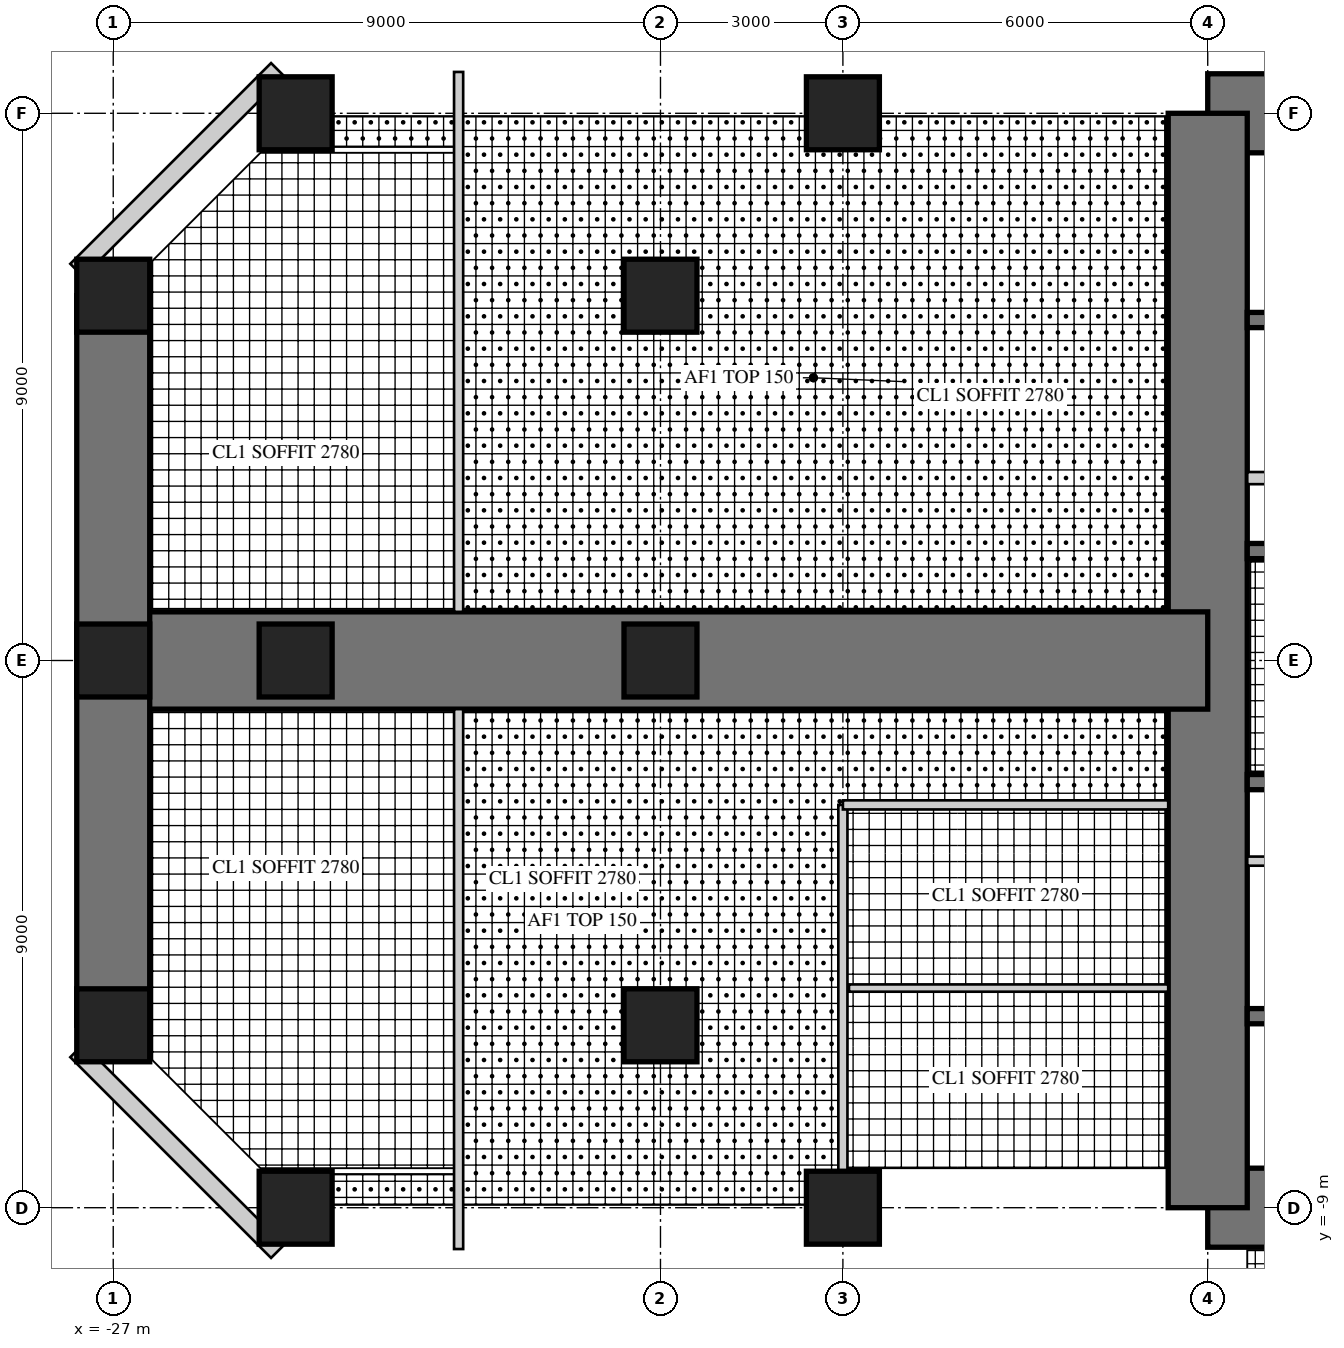
"""IFC4 building model, lengths in metres.
Left out: names, types, materials, properties, quantities, classifications, styles, units other than length and angle.
Written with IfcOpenShell. Run it as: python <this file> out.ifc"""

import sys

from ifc_helpers import new_model, si_unit, direction, frame, frame_2d, origin, origin_2d, place, context, subcontext, project, spatial, rectangle, hollow_rectangle, extrude, element, fill, save


model = new_model("IFC4")
c1 = context("Model", 3, precision=1e-05, world=origin(), true_north=direction((0.0, 1.0)))
c2 = subcontext(c1, "Body", "Model", "MODEL_VIEW")
j1 = project(units=[si_unit("LENGTHUNIT", "METRE"), si_unit("PLANEANGLEUNIT", "RADIAN")], contexts=[c1])
p1 = place(None, origin())
s1 = spatial("IfcSite", under=j1, at=p1, CompositionType="ELEMENT")
p2 = place(p1, origin())
s2 = spatial("IfcBuilding", under=s1, at=p2, CompositionType="ELEMENT")
p3 = place(p2, frame((0.0, 0.0, 35.5)))
s3 = spatial("IfcBuildingStorey", under=s2, at=p3, CompositionType="ELEMENT", Elevation=35.5)
p4 = place(p3, frame((9.0, 9.0, 0.0), z_axis=(0.0, 0.0, 1.0), x_axis=(-1.0, 0.0, 0.0)))
e1 = element("IfcWall", 1, at=p4, inside=s3, PredefinedType="SHEAR", context=c2, shape_type="SweptSolid", body=[
    extrude(rectangle(XDim=18.0, YDim=1.3, at=frame_2d((9.0, 0.0))), origin(), (0.0, 0.0, 1.0), 4.0),
])
p5 = place(p4, frame((9.8, 0.0, 0.0)))
e2 = element("IfcOpeningElement", 2, at=p5, cuts=e1, PredefinedType="OPENING", context=c2, shape_type="SweptSolid", body=[
    extrude(rectangle(XDim=1.0, YDim=2.4, at=frame_2d((0.5, 1.2))), frame((0.0, 0.66, 0.0), z_axis=(0.0, -1.0, 0.0), x_axis=(1.0, 0.0, 0.0)), (0.0, 0.0, 1.0), 1.32),
])
p6 = place(p3, frame((-9.0, -9.0, 0.0), z_axis=(0.0, 0.0, 1.0), x_axis=(1.0, 0.0, 0.0)))
e3 = element("IfcWall", 3, at=p6, inside=s3, PredefinedType="SHEAR", context=c2, shape_type="SweptSolid", body=[
    extrude(rectangle(XDim=18.0, YDim=1.3, at=frame_2d((9.0, 0.0))), origin(), (0.0, 0.0, 1.0), 4.0),
])
p7 = place(p6, frame((9.8, 0.0, 0.0)))
e4 = element("IfcOpeningElement", 4, at=p7, cuts=e3, PredefinedType="OPENING", context=c2, shape_type="SweptSolid", body=[
    extrude(rectangle(XDim=1.0, YDim=2.4, at=frame_2d((0.5, 1.2))), frame((0.0, 0.66, 0.0), z_axis=(0.0, -1.0, 0.0), x_axis=(1.0, 0.0, 0.0)), (0.0, 0.0, 1.0), 1.32),
])
p8 = place(p3, frame((-9.0, 9.0, 0.0), z_axis=(0.0, 0.0, 1.0), x_axis=(0.0, -1.0, 0.0)))
e5 = element("IfcWall", 5, at=p8, inside=s3, PredefinedType="SHEAR", context=c2, shape_type="SweptSolid", body=[
    extrude(rectangle(XDim=18.0, YDim=1.3, at=frame_2d((9.0, 0.0))), origin(), (0.0, 0.0, 1.0), 4.0),
])
p9 = place(p8, frame((9.8, 0.0, 0.0)))
e6 = element("IfcOpeningElement", 6, at=p9, cuts=e5, PredefinedType="OPENING", context=c2, shape_type="SweptSolid", body=[
    extrude(rectangle(XDim=1.0, YDim=2.4, at=frame_2d((0.5, 1.2))), frame((0.0, 0.66, 0.0), z_axis=(0.0, -1.0, 0.0), x_axis=(1.0, 0.0, 0.0)), (0.0, 0.0, 1.0), 1.32),
])
p10 = place(p3, frame((-2.125, 1.8, 0.0), z_axis=(0.0, 0.0, 1.0), x_axis=(-1.0, 0.0, 0.0)))
e7 = element("IfcWall", 7, at=p10, inside=s3, PredefinedType="SHEAR", context=c2, shape_type="SweptSolid", body=[
    extrude(rectangle(XDim=6.225, YDim=0.25, at=frame_2d((3.113, 0.0))), origin(), (0.0, 0.0, 1.0), 4.0),
])
p11 = place(p3, frame((-2.125, 5.6, 0.0), z_axis=(0.0, 0.0, 1.0), x_axis=(-1.0, 0.0, 0.0)))
e8 = element("IfcWall", 8, at=p11, inside=s3, PredefinedType="SHEAR", context=c2, shape_type="SweptSolid", body=[
    extrude(rectangle(XDim=6.225, YDim=0.25, at=frame_2d((3.113, 0.0))), origin(), (0.0, 0.0, 1.0), 4.0),
])
p12 = place(p11, frame((0.175, 0.0, 0.0)))
e9 = element("IfcOpeningElement", 9, at=p12, cuts=e8, PredefinedType="OPENING", context=c2, shape_type="SweptSolid", body=[
    extrude(rectangle(XDim=1.0, YDim=2.1, at=frame_2d((0.5, 1.05))), frame((0.0, 0.135, 0.0), z_axis=(0.0, -1.0, 0.0), x_axis=(1.0, 0.0, 0.0)), (0.0, 0.0, 1.0), 0.27),
])
p13 = place(p3, frame((-5.725, 3.0, 0.0), z_axis=(0.0, 0.0, 1.0), x_axis=(-1.0, 0.0, 0.0)))
e10 = element("IfcWall", 10, at=p13, inside=s3, PredefinedType="PARTITIONING", context=c2, shape_type="SweptSolid", body=[
    extrude(rectangle(XDim=2.625, YDim=0.2, at=frame_2d((1.312, 0.0))), origin(), (0.0, 0.0, 1.0), 4.0),
])
for number, where, z_axis, x_axis in (
    (11, (-1.925, -2.0, 0.0), (0.0, 0.0, 1.0), (-1.0, 0.0, 0.0)),
    (12, (-1.925, -5.85, 0.0), (0.0, 0.0, 1.0), (-1.0, 0.0, 0.0)),
):
    element("IfcWall", number, at=place(p3, frame(where, z_axis=z_axis, x_axis=x_axis)), inside=s3, PredefinedType="SHEAR", context=c2, shape_type="SweptSolid", body=[
        extrude(rectangle(XDim=6.425, YDim=0.25, at=frame_2d((3.212, 0.0))), origin(), (0.0, 0.0, 1.0), 4.0),
    ])
p14 = place(p3, frame((-1.925, -3.3, 0.0), z_axis=(0.0, 0.0, 1.0), x_axis=(-1.0, 0.0, 0.0)))
e13 = element("IfcWall", 13, at=p14, inside=s3, PredefinedType="PARTITIONING", context=c2, shape_type="SweptSolid", body=[
    extrude(rectangle(XDim=6.425, YDim=0.15, at=frame_2d((3.212, 0.0))), origin(), (0.0, 0.0, 1.0), 4.0),
])
p15 = place(p14, frame((0.075, 0.0, 0.0)))
e14 = element("IfcOpeningElement", 14, at=p15, cuts=e13, PredefinedType="OPENING", context=c2, shape_type="SweptSolid", body=[
    extrude(rectangle(XDim=0.8, YDim=2.1, at=frame_2d((0.4, 1.05))), frame((0.0, 0.085, 0.0), z_axis=(0.0, -1.0, 0.0), x_axis=(1.0, 0.0, 0.0)), (0.0, 0.0, 1.0), 0.17),
])
p16 = place(p14, frame((3.675, 0.0, 0.0)))
e15 = element("IfcOpeningElement", 15, at=p16, cuts=e13, PredefinedType="OPENING", context=c2, shape_type="SweptSolid", body=[
    extrude(rectangle(XDim=0.8, YDim=2.1, at=frame_2d((0.4, 1.05))), frame((0.0, 0.085, 0.0), z_axis=(0.0, -1.0, 0.0), x_axis=(1.0, 0.0, 0.0)), (0.0, 0.0, 1.0), 0.17),
])
p17 = place(p3, frame((-9.0, 0.0, 0.0), z_axis=(0.0, 0.0, 1.0), x_axis=(-1.0, 0.0, 0.0)))
e16 = element("IfcWall", 16, at=p17, inside=s3, PredefinedType="SHEAR", context=c2, shape_type="SweptSolid", body=[
    extrude(rectangle(XDim=18.0, YDim=1.6, at=frame_2d((9.0, 0.0))), origin(), (0.0, 0.0, 1.0), 4.0),
])
p18 = place(p17, frame((9.9, 0.0, 0.0)))
e17 = element("IfcOpeningElement", 17, at=p18, cuts=e16, PredefinedType="OPENING", context=c2, shape_type="SweptSolid", body=[
    extrude(rectangle(XDim=1.0, YDim=2.2, at=frame_2d((0.5, 1.1))), frame((0.0, 0.81, 0.0), z_axis=(0.0, -1.0, 0.0), x_axis=(1.0, 0.0, 0.0)), (0.0, 0.0, 1.0), 1.62),
])
p19 = place(p3, frame((-27.0, 6.0, 0.0), z_axis=(0.0, 0.0, 1.0), x_axis=(0.0, -1.0, 0.0)))
e18 = element("IfcWall", 18, at=p19, inside=s3, PredefinedType="SHEAR", context=c2, shape_type="SweptSolid", body=[
    extrude(rectangle(XDim=12.0, YDim=1.2, at=frame_2d((6.0, 0.0))), origin(), (0.0, 0.0, 1.0), 4.0),
])
p20 = place(p19, frame((1.5, 0.0, 0.6)))
e19 = element("IfcOpeningElement", 19, at=p20, cuts=e18, PredefinedType="OPENING", context=c2, shape_type="SweptSolid", body=[
    extrude(rectangle(XDim=3.0, YDim=2.4, at=frame_2d((1.5, 1.2))), frame((0.0, 0.61, 0.0), z_axis=(0.0, -1.0, 0.0), x_axis=(1.0, 0.0, 0.0)), (0.0, 0.0, 1.0), 1.22),
])
p21 = place(p19, frame((7.5, 0.0, 0.6)))
e20 = element("IfcOpeningElement", 20, at=p21, cuts=e18, PredefinedType="OPENING", context=c2, shape_type="SweptSolid", body=[
    extrude(rectangle(XDim=3.0, YDim=2.4, at=frame_2d((1.5, 1.2))), frame((0.0, 0.61, 0.0), z_axis=(0.0, -1.0, 0.0), x_axis=(1.0, 0.0, 0.0)), (0.0, 0.0, 1.0), 1.22),
])
for number, where, z_axis, x_axis in (
    (21, (-15.0, 9.0, 0.0), (0.0, 0.0, 1.0), (1.0, 0.0, 0.0)),
    (22, (-24.0, 9.0, 0.0), (0.0, 0.0, 1.0), (1.0, 0.0, 0.0)),
    (23, (-15.0, -9.0, 0.0), (0.0, 0.0, 1.0), (1.0, 0.0, 0.0)),
    (24, (-24.0, -9.0, 0.0), (0.0, 0.0, 1.0), (1.0, 0.0, 0.0)),
    (25, (-27.0, 6.0, 0.0), (0.0, 0.0, 1.0), (1.0, 0.0, 0.0)),
    (26, (-27.0, 0.0, 0.0), (0.0, 0.0, 1.0), (1.0, 0.0, 0.0)),
    (27, (-27.0, -6.0, 0.0), (0.0, 0.0, 1.0), (1.0, 0.0, 0.0)),
    (28, (-18.0, 6.0, 0.0), (0.0, 0.0, 1.0), (1.0, 0.0, 0.0)),
    (29, (-18.0, 0.0, 0.0), (0.0, 0.0, 1.0), (1.0, 0.0, 0.0)),
    (30, (-18.0, -6.0, 0.0), (0.0, 0.0, 1.0), (1.0, 0.0, 0.0)),
    (31, (-24.0, 0.0, 0.0), (0.0, 0.0, 1.0), (1.0, 0.0, 0.0)),
):
    element("IfcColumn", number, at=place(p3, frame(where, z_axis=z_axis, x_axis=x_axis)), inside=s3, PredefinedType="COLUMN", context=c2, shape_type="SweptSolid", body=[
        extrude(rectangle(XDim=1.2, YDim=1.2, at=origin_2d()), origin(), (0.0, 0.0, 1.0), 4.0),
    ])
p22 = place(p3, frame((-24.298, 9.72, 0.0), z_axis=(0.0, 0.0, 1.0), x_axis=(-0.707106781187, -0.707106781187, 0.0)))
e32 = element("IfcWall", 32, at=p22, inside=s3, PredefinedType="SOLIDWALL", context=c2, shape_type="SweptSolid", body=[
    extrude(rectangle(XDim=4.669, YDim=0.3, at=frame_2d((2.335, 0.0))), origin(), (0.0, 0.0, 1.0), 3.8),
])
p23 = place(p22, frame((1.885, 0.0, 0.3)))
e33 = element("IfcOpeningElement", 33, at=p23, cuts=e32, PredefinedType="OPENING", context=c2, shape_type="SweptSolid", body=[
    extrude(rectangle(XDim=0.9, YDim=2.4, at=frame_2d((0.45, 1.2))), frame((0.0, 0.16, 0.0), z_axis=(0.0, -1.0, 0.0), x_axis=(1.0, 0.0, 0.0)), (0.0, 0.0, 1.0), 0.32),
])
p24 = place(p3, frame((-27.6, -6.418, 0.0), z_axis=(0.0, 0.0, 1.0), x_axis=(0.707106781187, -0.707106781187, 0.0)))
e34 = element("IfcWall", 34, at=p24, inside=s3, PredefinedType="SOLIDWALL", context=c2, shape_type="SweptSolid", body=[
    extrude(rectangle(XDim=4.669, YDim=0.3, at=frame_2d((2.335, 0.0))), origin(), (0.0, 0.0, 1.0), 3.8),
])
p25 = place(p24, frame((1.885, 0.0, 0.3)))
e35 = element("IfcOpeningElement", 35, at=p25, cuts=e34, PredefinedType="OPENING", context=c2, shape_type="SweptSolid", body=[
    extrude(rectangle(XDim=0.9, YDim=2.4, at=frame_2d((0.45, 1.2))), frame((0.0, 0.16, 0.0), z_axis=(0.0, -1.0, 0.0), x_axis=(1.0, 0.0, 0.0)), (0.0, 0.0, 1.0), 0.32),
])
p26 = place(p3, frame((-15.0, -2.375, 0.0), z_axis=(0.0, 0.0, 1.0), x_axis=(0.0, -1.0, 0.0)))
e36 = element("IfcWall", 36, at=p26, inside=s3, PredefinedType="PARTITIONING", context=c2, shape_type="SweptSolid", body=[
    extrude(rectangle(XDim=6.025, YDim=0.15, at=frame_2d((3.012, 0.0))), origin(), (0.0, 0.0, 1.0), 2.95),
])
p27 = place(p26, frame((1.006, 0.0, 0.0)))
e37 = element("IfcOpeningElement", 37, at=p27, cuts=e36, PredefinedType="OPENING", context=c2, shape_type="SweptSolid", body=[
    extrude(rectangle(XDim=1.0, YDim=2.1, at=frame_2d((0.5, 1.05))), frame((0.0, 0.085, 0.0), z_axis=(0.0, -1.0, 0.0), x_axis=(1.0, 0.0, 0.0)), (0.0, 0.0, 1.0), 0.17),
])
p28 = place(p26, frame((4.019, 0.0, 0.0)))
e38 = element("IfcOpeningElement", 38, at=p28, cuts=e36, PredefinedType="OPENING", context=c2, shape_type="SweptSolid", body=[
    extrude(rectangle(XDim=1.0, YDim=2.1, at=frame_2d((0.5, 1.05))), frame((0.0, 0.085, 0.0), z_axis=(0.0, -1.0, 0.0), x_axis=(1.0, 0.0, 0.0)), (0.0, 0.0, 1.0), 0.17),
])
p29 = place(p3, frame((-9.65, -2.375, 0.0), z_axis=(0.0, 0.0, 1.0), x_axis=(-1.0, 0.0, 0.0)))
e39 = element("IfcWall", 39, at=p29, inside=s3, PredefinedType="PARTITIONING", context=c2, shape_type="SweptSolid", body=[
    extrude(rectangle(XDim=5.35, YDim=0.15, at=frame_2d((2.675, 0.0))), origin(), (0.0, 0.0, 1.0), 3.8),
])
p30 = place(p3, frame((-9.65, -5.387, 0.0), z_axis=(0.0, 0.0, 1.0), x_axis=(-1.0, 0.0, 0.0)))
e40 = element("IfcWall", 40, at=p30, inside=s3, PredefinedType="PLUMBINGWALL", context=c2, shape_type="SweptSolid", body=[
    extrude(rectangle(XDim=5.25, YDim=0.12, at=frame_2d((2.625, 0.0))), origin(), (0.0, 0.0, 1.0), 3.8),
])
p31 = place(p3, frame((-21.32, -0.8, 0.0), z_axis=(0.0, 0.0, 1.0), x_axis=(0.0, -1.0, 0.0)))
e41 = element("IfcWall", 41, at=p31, inside=s3, PredefinedType="PARTITIONING", context=c2, shape_type="SweptSolid", body=[
    extrude(rectangle(XDim=8.88, YDim=0.15, at=frame_2d((4.44, 0.0))), origin(), (0.0, 0.0, 1.0), 3.8),
])
p32 = place(p31, frame((0.45, 0.0, 0.0)))
e42 = element("IfcOpeningElement", 42, at=p32, cuts=e41, PredefinedType="OPENING", context=c2, shape_type="SweptSolid", body=[
    extrude(rectangle(XDim=1.0, YDim=2.2, at=frame_2d((0.5, 1.1))), frame((0.0, 0.085, 0.0), z_axis=(0.0, -1.0, 0.0), x_axis=(1.0, 0.0, 0.0)), (0.0, 0.0, 1.0), 0.17),
])
p33 = place(p3, frame((-21.32, 9.68, 0.0), z_axis=(0.0, 0.0, 1.0), x_axis=(0.0, -1.0, 0.0)))
e43 = element("IfcWall", 43, at=p33, inside=s3, PredefinedType="PARTITIONING", context=c2, shape_type="SweptSolid", body=[
    extrude(rectangle(XDim=8.88, YDim=0.15, at=frame_2d((4.44, 0.0))), origin(), (0.0, 0.0, 1.0), 3.8),
])
p34 = place(p33, frame((7.43, 0.0, 0.0)))
e44 = element("IfcOpeningElement", 44, at=p34, cuts=e43, PredefinedType="OPENING", context=c2, shape_type="SweptSolid", body=[
    extrude(rectangle(XDim=1.0, YDim=2.2, at=frame_2d((0.5, 1.1))), frame((0.0, 0.085, 0.0), z_axis=(0.0, -1.0, 0.0), x_axis=(1.0, 0.0, 0.0)), (0.0, 0.0, 1.0), 0.17),
])
p35 = place(p23, origin())
e45 = element("IfcWindow", 45, at=p35, inside=s3, PartitioningType="SINGLE_PANEL", PredefinedType="WINDOW", context=c2, shape_type="SweptSolid", body=[
    extrude(hollow_rectangle(XDim=0.9, YDim=2.4, WallThickness=0.06, at=frame_2d((0.45, 1.2))), frame((0.0, 0.03, 0.0), z_axis=(0.0, -1.0, 0.0), x_axis=(1.0, 0.0, 0.0)), (0.0, 0.0, 1.0), 0.06),
    extrude(rectangle(XDim=0.779, YDim=2.279, at=frame_2d((0.45, 1.2))), frame((0.0, 0.03, 0.0), z_axis=(0.0, -1.0, 0.0), x_axis=(1.0, 0.0, 0.0)), (0.0, 0.0, 1.0), 0.06),
])
fill(e33, e45)
p36 = place(p20, origin())
e46 = element("IfcWindow", 46, at=p36, inside=s3, PartitioningType="SINGLE_PANEL", PredefinedType="WINDOW", context=c2, shape_type="SweptSolid", body=[
    extrude(hollow_rectangle(XDim=3.0, YDim=2.4, WallThickness=0.06, at=frame_2d((1.5, 1.2))), frame((0.0, 0.03, 0.0), z_axis=(0.0, -1.0, 0.0), x_axis=(1.0, 0.0, 0.0)), (0.0, 0.0, 1.0), 0.06),
    extrude(rectangle(XDim=2.879, YDim=2.279, at=frame_2d((1.5, 1.2))), frame((0.0, 0.03, 0.0), z_axis=(0.0, -1.0, 0.0), x_axis=(1.0, 0.0, 0.0)), (0.0, 0.0, 1.0), 0.06),
])
fill(e19, e46)
p37 = place(p21, origin())
e47 = element("IfcWindow", 47, at=p37, inside=s3, PartitioningType="SINGLE_PANEL", PredefinedType="WINDOW", context=c2, shape_type="SweptSolid", body=[
    extrude(hollow_rectangle(XDim=3.0, YDim=2.4, WallThickness=0.06, at=frame_2d((1.5, 1.2))), frame((0.0, 0.03, 0.0), z_axis=(0.0, -1.0, 0.0), x_axis=(1.0, 0.0, 0.0)), (0.0, 0.0, 1.0), 0.06),
    extrude(rectangle(XDim=2.879, YDim=2.279, at=frame_2d((1.5, 1.2))), frame((0.0, 0.03, 0.0), z_axis=(0.0, -1.0, 0.0), x_axis=(1.0, 0.0, 0.0)), (0.0, 0.0, 1.0), 0.06),
])
fill(e20, e47)
p38 = place(p25, origin())
e48 = element("IfcWindow", 48, at=p38, inside=s3, PartitioningType="SINGLE_PANEL", PredefinedType="WINDOW", context=c2, shape_type="SweptSolid", body=[
    extrude(hollow_rectangle(XDim=0.9, YDim=2.4, WallThickness=0.06, at=frame_2d((0.45, 1.2))), frame((0.0, 0.03, 0.0), z_axis=(0.0, -1.0, 0.0), x_axis=(1.0, 0.0, 0.0)), (0.0, 0.0, 1.0), 0.06),
    extrude(rectangle(XDim=0.779, YDim=2.279, at=frame_2d((0.45, 1.2))), frame((0.0, 0.03, 0.0), z_axis=(0.0, -1.0, 0.0), x_axis=(1.0, 0.0, 0.0)), (0.0, 0.0, 1.0), 0.06),
])
fill(e35, e48)
p39 = place(p27, origin())
e49 = element("IfcDoor", 49, at=p39, inside=s3, OperationType="SINGLE_SWING_LEFT", PredefinedType="DOOR", context=c2, shape_type="SweptSolid", body=[
    extrude(rectangle(XDim=1.0, YDim=2.1, at=frame_2d((0.5, 1.05))), frame((0.0, 0.025, 0.0), z_axis=(0.0, -1.0, 0.0), x_axis=(1.0, 0.0, 0.0)), (0.0, 0.0, 1.0), 0.05),
])
fill(e37, e49)
p40 = place(p28, origin())
e50 = element("IfcDoor", 50, at=p40, inside=s3, OperationType="SINGLE_SWING_LEFT", PredefinedType="DOOR", context=c2, shape_type="SweptSolid", body=[
    extrude(rectangle(XDim=1.0, YDim=2.1, at=frame_2d((0.5, 1.05))), frame((0.0, 0.025, 0.0), z_axis=(0.0, -1.0, 0.0), x_axis=(1.0, 0.0, 0.0)), (0.0, 0.0, 1.0), 0.05),
])
fill(e38, e50)
p41 = place(p32, frame((1.0, 0.0, 0.0), z_axis=(0.0, 0.0, 1.0), x_axis=(-1.0, 0.0, 0.0)))
e51 = element("IfcDoor", 51, at=p41, inside=s3, OperationType="SINGLE_SWING_RIGHT", PredefinedType="DOOR", context=c2, shape_type="SweptSolid", body=[
    extrude(rectangle(XDim=1.0, YDim=2.2, at=frame_2d((0.5, 1.1))), frame((0.0, 0.025, 0.0), z_axis=(0.0, -1.0, 0.0), x_axis=(1.0, 0.0, 0.0)), (0.0, 0.0, 1.0), 0.05),
])
fill(e42, e51)
p42 = place(p34, frame((1.0, 0.0, 0.0), z_axis=(0.0, 0.0, 1.0), x_axis=(-1.0, 0.0, 0.0)))
e52 = element("IfcDoor", 52, at=p42, inside=s3, OperationType="SINGLE_SWING_LEFT", PredefinedType="DOOR", context=c2, shape_type="SweptSolid", body=[
    extrude(rectangle(XDim=1.0, YDim=2.2, at=frame_2d((0.5, 1.1))), frame((0.0, 0.025, 0.0), z_axis=(0.0, -1.0, 0.0), x_axis=(1.0, 0.0, 0.0)), (0.0, 0.0, 1.0), 0.05),
])
fill(e44, e52)
p43 = place(p18, origin())
e53 = element("IfcDoor", 53, at=p43, inside=s3, OperationType="SINGLE_SWING_RIGHT", PredefinedType="DOOR", context=c2, shape_type="SweptSolid", body=[
    extrude(rectangle(XDim=1.0, YDim=2.2, at=frame_2d((0.5, 1.1))), frame((0.0, 0.025, 0.0), z_axis=(0.0, -1.0, 0.0), x_axis=(1.0, 0.0, 0.0)), (0.0, 0.0, 1.0), 0.05),
])
fill(e17, e53)
p44 = place(p9, frame((1.0, 0.0, 0.0), z_axis=(0.0, 0.0, 1.0), x_axis=(-1.0, 0.0, 0.0)))
e54 = element("IfcDoor", 54, at=p44, inside=s3, OperationType="SINGLE_SWING_RIGHT", PredefinedType="DOOR", context=c2, shape_type="SweptSolid", body=[
    extrude(rectangle(XDim=1.0, YDim=2.4, at=frame_2d((0.5, 1.2))), frame((0.0, -0.005, 0.0), z_axis=(0.0, -1.0, 0.0), x_axis=(1.0, 0.0, 0.0)), (0.0, 0.0, 1.0), 0.05),
])
fill(e6, e54)
save(model, sys.argv[1])
